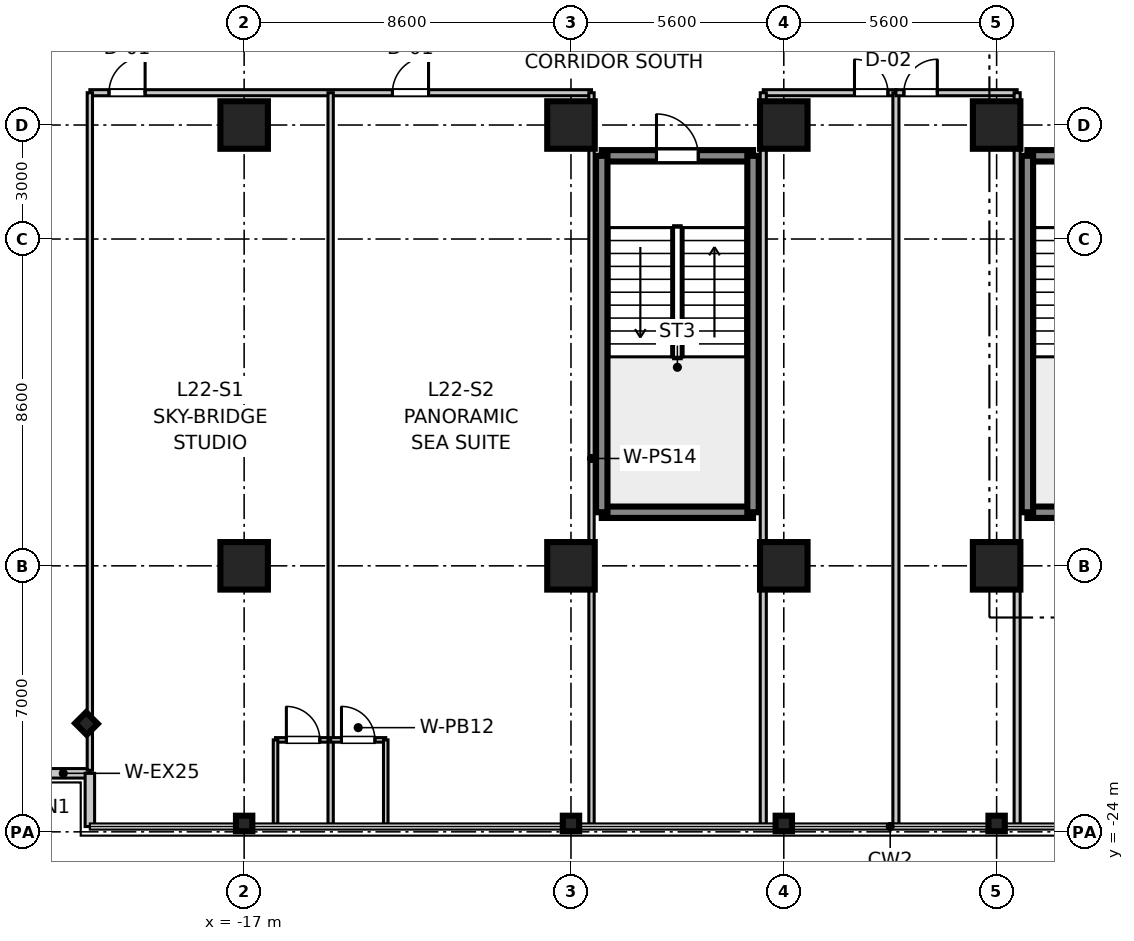
"""IFC4 building model, lengths in metres.
Left out: names, types, materials, properties, quantities, classifications, styles, units other than length and angle.
Written with IfcOpenShell. Run it as: python <this file> out.ifc"""

import sys

from ifc_helpers import new_model, si_unit, direction, frame, frame_2d, origin, origin_2d, place, context, subcontext, project, spatial, rectangle, i_section, extrude, source, transform, mapped, element, fill, save


model = new_model("IFC4")
c1 = context("Model", 3, precision=1e-05, world=origin(), true_north=direction((0.0, 1.0)))
c2 = subcontext(c1, "Body", "Model", "MODEL_VIEW")
j1 = project(units=[si_unit("LENGTHUNIT", "METRE"), si_unit("PLANEANGLEUNIT", "RADIAN")], contexts=[c1])
p1 = place(None, origin())
s1 = spatial("IfcSite", under=j1, at=p1, CompositionType="ELEMENT")
p2 = place(p1, origin())
s2 = spatial("IfcBuilding", under=s1, at=p2, CompositionType="ELEMENT")
p3 = place(p2, frame((0.0, 0.0, 91.95)))
s3 = spatial("IfcBuildingStorey", under=s2, at=p3, CompositionType="ELEMENT", Elevation=91.95)
m1 = source(origin(), c2, "Body", "SweptSolid", [
    extrude(rectangle(XDim=1.25, YDim=1.25, at=origin_2d()), origin(), (0.0, 0.0, 1.0), 3.605),
])
for number, where, z_axis, x_axis in (
    (1, (-17.0, -17.0, 0.0), (0.0, 0.0, 1.0), (1.0, 0.0, 0.0)),
    (2, (-17.0, -5.4, 0.0), (0.0, 0.0, 1.0), (1.0, 0.0, 0.0)),
    (3, (-8.4, -17.0, 0.0), (0.0, 0.0, 1.0), (1.0, 0.0, 0.0)),
    (4, (-8.4, -5.4, 0.0), (0.0, 0.0, 1.0), (1.0, 0.0, 0.0)),
    (5, (-2.8, -17.0, 0.0), (0.0, 0.0, 1.0), (1.0, 0.0, 0.0)),
    (6, (-2.8, -5.4, 0.0), (0.0, 0.0, 1.0), (1.0, 0.0, 0.0)),
    (7, (2.8, -17.0, 0.0), (0.0, 0.0, 1.0), (1.0, 0.0, 0.0)),
    (8, (2.8, -5.4, 0.0), (0.0, 0.0, 1.0), (1.0, 0.0, 0.0)),
):
    element("IfcColumn", number, at=place(p3, frame(where, z_axis=z_axis, x_axis=x_axis)), inside=s3, PredefinedType="COLUMN", context=c2, shape_type="MappedRepresentation", body=[
        mapped(m1, transform((0.0, 0.0, 0.0), scale=1.0)),
    ])
m2 = source(origin(), c2, "Body", "SweptSolid", [
    extrude(i_section(OverallWidth=0.409, OverallDepth=0.43, WebThickness=0.021, FlangeThickness=0.034, at=origin_2d()), origin(), (0.0, 0.0, 1.0), 3.605),
])
for number, where, z_axis, x_axis in (
    (9, (-17.0, -23.78, 0.0), (0.0, 0.0, 1.0), (0.0, 1.0, 0.0)),
    (10, (-8.4, -23.78, 0.0), (0.0, 0.0, 1.0), (0.0, 1.0, 0.0)),
    (11, (-2.8, -23.78, 0.0), (0.0, 0.0, 1.0), (0.0, 1.0, 0.0)),
    (12, (2.8, -23.78, 0.0), (0.0, 0.0, 1.0), (0.0, 1.0, 0.0)),
    (13, (-21.15, -21.15, 0.0), (0.0, 0.0, 1.0), (0.707, 0.707, 0.0)),
):
    element("IfcColumn", number, at=place(p3, frame(where, z_axis=z_axis, x_axis=x_axis)), inside=s3, PredefinedType="COLUMN", context=c2, shape_type="MappedRepresentation", body=[
        mapped(m2, transform((0.0, 0.0, 0.0), scale=1.0)),
    ])
m3 = source(origin(), c2, "Body", "SweptSolid", [
    extrude(rectangle(XDim=3.98, YDim=0.3, at=frame_2d((1.99, 0.0))), origin(), (0.0, 0.0, 1.0), 3.38),
])
for number, where, z_axis, x_axis in (
    (14, (3.61, -15.59, 0.0), (0.0, 0.0, 1.0), (1.0, 0.0, 0.0)),
    (15, (3.61, -6.21, 0.0), (0.0, 0.0, 1.0), (1.0, 0.0, 0.0)),
):
    element("IfcWall", number, at=place(p3, frame(where, z_axis=z_axis, x_axis=x_axis)), inside=s3, PredefinedType="SHEAR", context=c2, shape_type="MappedRepresentation", body=[
        mapped(m3, transform((0.0, 0.0, 0.0), scale=1.0)),
    ])
m4 = source(origin(), c2, "Body", "SweptSolid", [
    extrude(rectangle(XDim=9.38, YDim=0.3, at=frame_2d((4.69, 0.0))), origin(), (0.0, 0.0, 1.0), 3.38),
])
p4 = place(p3, frame((3.61, -15.59, 0.0), z_axis=(0.0, 0.0, 1.0), x_axis=(0.0, 1.0, 0.0)))
e16 = element("IfcWall", 16, at=p4, inside=s3, PredefinedType="SHEAR", context=c2, shape_type="MappedRepresentation", body=[
    mapped(m4, transform((0.0, 0.0, 0.0), scale=1.0)),
])
p5 = place(p3, frame((-7.59, -15.59, 0.0), z_axis=(0.0, 0.0, 1.0), x_axis=(1.0, 0.0, 0.0)))
e17 = element("IfcWall", 17, at=p5, inside=s3, PredefinedType="SHEAR", context=c2, shape_type="MappedRepresentation", body=[
    mapped(m3, transform((0.0, 0.0, 0.0), scale=1.0)),
])
p6 = place(p3, frame((-7.59, -6.21, 0.0), z_axis=(0.0, 0.0, 1.0), x_axis=(1.0, 0.0, 0.0)))
e18 = element("IfcWall", 18, at=p6, inside=s3, PredefinedType="SHEAR", context=c2, shape_type="MappedRepresentation", body=[
    mapped(m3, transform((0.0, 0.0, 0.0), scale=1.0)),
])
p7 = place(p6, frame((1.44, 0.0, 0.0)))
e19 = element("IfcOpeningElement", 19, at=p7, cuts=e18, PredefinedType="OPENING", context=c2, shape_type="SweptSolid", body=[
    extrude(rectangle(XDim=1.1, YDim=2.15, at=frame_2d((0.55, 1.075))), frame((0.0, 0.16, 0.0), z_axis=(0.0, -1.0, 0.0), x_axis=(1.0, 0.0, 0.0)), (0.0, 0.0, 1.0), 0.32),
])
for number, where, z_axis, x_axis in (
    (20, (-7.59, -15.59, 0.0), (0.0, 0.0, 1.0), (0.0, 1.0, 0.0)),
    (21, (-3.61, -15.59, 0.0), (0.0, 0.0, 1.0), (0.0, 1.0, 0.0)),
):
    element("IfcWall", number, at=place(p3, frame(where, z_axis=z_axis, x_axis=x_axis)), inside=s3, PredefinedType="SHEAR", context=c2, shape_type="MappedRepresentation", body=[
        mapped(m4, transform((0.0, 0.0, 0.0), scale=1.0)),
    ])
m5 = source(origin(), c2, "Body", "SweptSolid", [
    extrude(rectangle(XDim=1.4, YDim=0.25, at=frame_2d((0.7, 0.0))), origin(), (0.0, 0.0, 1.0), 3.38),
])
p8 = place(p3, frame((-22.46, -22.46, 0.0), z_axis=(0.0, 0.0, 1.0), x_axis=(1.0, 0.0, 0.0)))
e22 = element("IfcWall", 22, at=p8, inside=s3, PredefinedType="STANDARD", context=c2, shape_type="MappedRepresentation", body=[
    mapped(m5, transform((0.0, 0.0, 0.0), scale=1.0)),
])
m6 = source(origin(), c2, "Body", "SweptSolid", [
    extrude(rectangle(XDim=1.4, YDim=0.25, at=frame_2d((0.7, 0.0))), origin(), (0.0, 0.0, 1.0), 3.38),
])
p9 = place(p3, frame((-21.06, -23.86, 0.0), z_axis=(0.0, 0.0, 1.0), x_axis=(0.0, 1.0, 0.0)))
e23 = element("IfcWall", 23, at=p9, inside=s3, PredefinedType="STANDARD", context=c2, shape_type="MappedRepresentation", body=[
    mapped(m6, transform((0.0, 0.0, 0.0), scale=1.0)),
])
m7 = source(origin(), c2, "Body", "SweptSolid", [
    extrude(rectangle(XDim=13.2, YDim=0.16, at=frame_2d((6.6, 0.0))), origin(), (0.0, 0.0, 1.0), 2.72),
])
p10 = place(p3, frame((-21.06, -4.55, 0.0), z_axis=(0.0, 0.0, 1.0), x_axis=(1.0, 0.0, 0.0)))
e24 = element("IfcWall", 24, at=p10, inside=s3, PredefinedType="PARTITIONING", context=c2, shape_type="MappedRepresentation", body=[
    mapped(m7, transform((0.0, 0.0, 0.0), scale=1.0)),
])
p11 = place(p10, frame((0.504, 0.0, 0.0)))
e25 = element("IfcOpeningElement", 25, at=p11, cuts=e24, PredefinedType="OPENING", context=c2, shape_type="SweptSolid", body=[
    extrude(rectangle(XDim=0.95, YDim=2.1, at=frame_2d((0.475, 1.05))), frame((0.0, 0.09, 0.0), z_axis=(0.0, -1.0, 0.0), x_axis=(1.0, 0.0, 0.0)), (0.0, 0.0, 1.0), 0.18),
])
p12 = place(p10, frame((7.962, 0.0, 0.0)))
e26 = element("IfcOpeningElement", 26, at=p12, cuts=e24, PredefinedType="OPENING", context=c2, shape_type="SweptSolid", body=[
    extrude(rectangle(XDim=0.95, YDim=2.1, at=frame_2d((0.475, 1.05))), frame((0.0, 0.09, 0.0), z_axis=(0.0, -1.0, 0.0), x_axis=(1.0, 0.0, 0.0)), (0.0, 0.0, 1.0), 0.18),
])
m8 = source(origin(), c2, "Body", "SweptSolid", [
    extrude(rectangle(XDim=17.83, YDim=0.14, at=frame_2d((8.915, 0.0))), origin(), (0.0, 0.0, 1.0), 2.72),
])
p13 = place(p3, frame((-21.06, -22.38, 0.0), z_axis=(0.0, 0.0, 1.0), x_axis=(0.0, 1.0, 0.0)))
e27 = element("IfcWall", 27, at=p13, inside=s3, PredefinedType="PARTITIONING", context=c2, shape_type="MappedRepresentation", body=[
    mapped(m8, transform((0.0, 0.0, 0.0), scale=1.0)),
])
m9 = source(origin(), c2, "Body", "SweptSolid", [
    extrude(rectangle(XDim=19.25, YDim=0.14, at=frame_2d((9.625, 0.0))), origin(), (0.0, 0.0, 1.0), 2.72),
])
p14 = place(p3, frame((-7.86, -23.8, 0.0), z_axis=(0.0, 0.0, 1.0), x_axis=(0.0, 1.0, 0.0)))
e28 = element("IfcWall", 28, at=p14, inside=s3, PredefinedType="PARTITIONING", context=c2, shape_type="MappedRepresentation", body=[
    mapped(m9, transform((0.0, 0.0, 0.0), scale=1.0)),
])
m10 = source(origin(), c2, "Body", "SweptSolid", [
    extrude(rectangle(XDim=1.45, YDim=0.12, at=frame_2d((0.725, 0.0))), origin(), (0.0, 0.0, 1.0), 2.72),
])
p15 = place(p3, frame((-16.174, -21.58, 0.0), z_axis=(0.0, 0.0, 1.0), x_axis=(1.0, 0.0, 0.0)))
e29 = element("IfcWall", 29, at=p15, inside=s3, PredefinedType="PARTITIONING", context=c2, shape_type="MappedRepresentation", body=[
    mapped(m10, transform((0.0, 0.0, 0.0), scale=1.0)),
])
p16 = place(p15, frame((0.285, 0.0, 0.0)))
e30 = element("IfcOpeningElement", 30, at=p16, cuts=e29, PredefinedType="OPENING", context=c2, shape_type="SweptSolid", body=[
    extrude(rectangle(XDim=0.88, YDim=2.1, at=frame_2d((0.44, 1.05))), frame((0.0, 0.07, 0.0), z_axis=(0.0, -1.0, 0.0), x_axis=(1.0, 0.0, 0.0)), (0.0, 0.0, 1.0), 0.14),
])
m11 = source(origin(), c2, "Body", "SweptSolid", [
    extrude(rectangle(XDim=2.22, YDim=0.12, at=frame_2d((1.11, 0.0))), origin(), (0.0, 0.0, 1.0), 2.72),
])
p17 = place(p3, frame((-16.174, -23.8, 0.0), z_axis=(0.0, 0.0, 1.0), x_axis=(0.0, 1.0, 0.0)))
e31 = element("IfcWall", 31, at=p17, inside=s3, PredefinedType="PARTITIONING", context=c2, shape_type="MappedRepresentation", body=[
    mapped(m11, transform((0.0, 0.0, 0.0), scale=1.0)),
])
p18 = place(p3, frame((-14.724, -23.8, 0.0), z_axis=(0.0, 0.0, 1.0), x_axis=(0.0, 1.0, 0.0)))
e32 = element("IfcWall", 32, at=p18, inside=s3, PredefinedType="PARTITIONING", context=c2, shape_type="MappedRepresentation", body=[
    mapped(m9, transform((0.0, 0.0, 0.0), scale=1.0)),
])
m12 = source(origin(), c2, "Body", "SweptSolid", [
    extrude(rectangle(XDim=1.45, YDim=0.12, at=frame_2d((0.725, 0.0))), origin(), (0.0, 0.0, 1.0), 2.72),
])
p19 = place(p3, frame((-14.724, -21.58, 0.0), z_axis=(0.0, 0.0, 1.0), x_axis=(1.0, 0.0, 0.0)))
e33 = element("IfcWall", 33, at=p19, inside=s3, PredefinedType="PARTITIONING", context=c2, shape_type="MappedRepresentation", body=[
    mapped(m12, transform((0.0, 0.0, 0.0), scale=1.0)),
])
p20 = place(p19, frame((0.285, 0.0, 0.0)))
e34 = element("IfcOpeningElement", 34, at=p20, cuts=e33, PredefinedType="OPENING", context=c2, shape_type="SweptSolid", body=[
    extrude(rectangle(XDim=0.88, YDim=2.1, at=frame_2d((0.44, 1.05))), frame((0.0, 0.07, 0.0), z_axis=(0.0, -1.0, 0.0), x_axis=(1.0, 0.0, 0.0)), (0.0, 0.0, 1.0), 0.14),
])
p21 = place(p3, frame((-13.274, -23.8, 0.0), z_axis=(0.0, 0.0, 1.0), x_axis=(0.0, 1.0, 0.0)))
e35 = element("IfcWall", 35, at=p21, inside=s3, PredefinedType="PARTITIONING", context=c2, shape_type="MappedRepresentation", body=[
    mapped(m11, transform((0.0, 0.0, 0.0), scale=1.0)),
])
m13 = source(origin(), c2, "Body", "SweptSolid", [
    extrude(rectangle(XDim=3.49, YDim=0.16, at=frame_2d((1.745, 0.0))), origin(), (0.0, 0.0, 1.0), 2.72),
])
p22 = place(p3, frame((-3.34, -4.55, 0.0), z_axis=(0.0, 0.0, 1.0), x_axis=(1.0, 0.0, 0.0)))
e36 = element("IfcWall", 36, at=p22, inside=s3, PredefinedType="PARTITIONING", context=c2, shape_type="MappedRepresentation", body=[
    mapped(m13, transform((0.0, 0.0, 0.0), scale=1.0)),
])
p23 = place(p22, frame((2.4, 0.0, 0.0)))
e37 = element("IfcOpeningElement", 37, at=p23, cuts=e36, PredefinedType="OPENING", context=c2, shape_type="SweptSolid", body=[
    extrude(rectangle(XDim=0.88, YDim=2.1, at=frame_2d((0.44, 1.05))), frame((0.0, 0.09, 0.0), z_axis=(0.0, -1.0, 0.0), x_axis=(1.0, 0.0, 0.0)), (0.0, 0.0, 1.0), 0.18),
])
m14 = source(origin(), c2, "Body", "SweptSolid", [
    extrude(rectangle(XDim=19.25, YDim=0.16, at=frame_2d((9.625, 0.0))), origin(), (0.0, 0.0, 1.0), 2.72),
])
for number, where, z_axis, x_axis in (
    (38, (-3.34, -23.8, 0.0), (0.0, 0.0, 1.0), (0.0, 1.0, 0.0)),
    (39, (0.15, -23.8, 0.0), (0.0, 0.0, 1.0), (0.0, 1.0, 0.0)),
):
    element("IfcWall", number, at=place(p3, frame(where, z_axis=z_axis, x_axis=x_axis)), inside=s3, PredefinedType="PARTITIONING", context=c2, shape_type="MappedRepresentation", body=[
        mapped(m14, transform((0.0, 0.0, 0.0), scale=1.0)),
    ])
m15 = source(origin(), c2, "Body", "SweptSolid", [
    extrude(rectangle(XDim=3.19, YDim=0.16, at=frame_2d((1.595, 0.0))), origin(), (0.0, 0.0, 1.0), 2.72),
])
p24 = place(p3, frame((0.15, -4.55, 0.0), z_axis=(0.0, 0.0, 1.0), x_axis=(1.0, 0.0, 0.0)))
e40 = element("IfcWall", 40, at=p24, inside=s3, PredefinedType="PARTITIONING", context=c2, shape_type="MappedRepresentation", body=[
    mapped(m15, transform((0.0, 0.0, 0.0), scale=1.0)),
])
p25 = place(p24, frame((0.21, 0.0, 0.0)))
e41 = element("IfcOpeningElement", 41, at=p25, cuts=e40, PredefinedType="OPENING", context=c2, shape_type="SweptSolid", body=[
    extrude(rectangle(XDim=0.88, YDim=2.1, at=frame_2d((0.44, 1.05))), frame((0.0, 0.09, 0.0), z_axis=(0.0, -1.0, 0.0), x_axis=(1.0, 0.0, 0.0)), (0.0, 0.0, 1.0), 0.18),
])
p26 = place(p3, frame((3.34, -23.8, 0.0), z_axis=(0.0, 0.0, 1.0), x_axis=(0.0, 1.0, 0.0)))
e42 = element("IfcWall", 42, at=p26, inside=s3, PredefinedType="PARTITIONING", context=c2, shape_type="MappedRepresentation", body=[
    mapped(m14, transform((0.0, 0.0, 0.0), scale=1.0)),
])
m16 = source(origin(), c2, "Body", "SweptSolid", [
    extrude(rectangle(XDim=1.1, YDim=2.15, at=frame_2d((0.55, 1.075))), frame((0.0, 0.025, 0.0), z_axis=(0.0, -1.0, 0.0), x_axis=(1.0, 0.0, 0.0)), (0.0, 0.0, 1.0), 0.05),
])
p27 = place(p7, frame((1.1, 0.0, 0.0), z_axis=(0.0, 0.0, 1.0), x_axis=(-1.0, 0.0, 0.0)))
e43 = element("IfcDoor", 43, at=p27, inside=s3, OperationType="SINGLE_SWING_LEFT", PredefinedType="DOOR", context=c2, shape_type="MappedRepresentation", body=[
    mapped(m16, transform((0.0, 0.0, 0.0), scale=1.0)),
])
fill(e19, e43)
m17 = source(origin(), c2, "Body", "SweptSolid", [
    extrude(rectangle(XDim=0.88, YDim=2.1, at=frame_2d((0.44, 1.05))), frame((0.0, 0.025, 0.0), z_axis=(0.0, -1.0, 0.0), x_axis=(1.0, 0.0, 0.0)), (0.0, 0.0, 1.0), 0.05),
])
p28 = place(p16, frame((0.88, 0.0, 0.0), z_axis=(0.0, 0.0, 1.0), x_axis=(-1.0, 0.0, 0.0)))
e44 = element("IfcDoor", 44, at=p28, inside=s3, OperationType="SINGLE_SWING_LEFT", PredefinedType="DOOR", context=c2, shape_type="MappedRepresentation", body=[
    mapped(m17, transform((0.0, 0.0, 0.0), scale=1.0)),
])
fill(e30, e44)
m18 = source(origin(), c2, "Body", "SweptSolid", [
    extrude(rectangle(XDim=0.95, YDim=2.1, at=frame_2d((0.475, 1.05))), frame((0.0, 0.025, 0.0), z_axis=(0.0, -1.0, 0.0), x_axis=(1.0, 0.0, 0.0)), (0.0, 0.0, 1.0), 0.05),
])
p29 = place(p11, frame((0.95, 0.0, 0.0), z_axis=(0.0, 0.0, 1.0), x_axis=(-1.0, 0.0, 0.0)))
e45 = element("IfcDoor", 45, at=p29, inside=s3, OperationType="SINGLE_SWING_RIGHT", PredefinedType="DOOR", context=c2, shape_type="MappedRepresentation", body=[
    mapped(m18, transform((0.0, 0.0, 0.0), scale=1.0)),
])
fill(e25, e45)
p30 = place(p20, frame((0.88, 0.0, 0.0), z_axis=(0.0, 0.0, 1.0), x_axis=(-1.0, 0.0, 0.0)))
e46 = element("IfcDoor", 46, at=p30, inside=s3, OperationType="SINGLE_SWING_LEFT", PredefinedType="DOOR", context=c2, shape_type="MappedRepresentation", body=[
    mapped(m17, transform((0.0, 0.0, 0.0), scale=1.0)),
])
fill(e34, e46)
p31 = place(p12, frame((0.95, 0.0, 0.0), z_axis=(0.0, 0.0, 1.0), x_axis=(-1.0, 0.0, 0.0)))
e47 = element("IfcDoor", 47, at=p31, inside=s3, OperationType="SINGLE_SWING_RIGHT", PredefinedType="DOOR", context=c2, shape_type="MappedRepresentation", body=[
    mapped(m18, transform((0.0, 0.0, 0.0), scale=1.0)),
])
fill(e26, e47)
p32 = place(p23, frame((0.88, 0.0, 0.0), z_axis=(0.0, 0.0, 1.0), x_axis=(-1.0, 0.0, 0.0)))
e48 = element("IfcDoor", 48, at=p32, inside=s3, OperationType="SINGLE_SWING_LEFT", PredefinedType="DOOR", context=c2, shape_type="MappedRepresentation", body=[
    mapped(m17, transform((0.0, 0.0, 0.0), scale=1.0)),
])
fill(e37, e48)
p33 = place(p25, frame((0.88, 0.0, 0.0), z_axis=(0.0, 0.0, 1.0), x_axis=(-1.0, 0.0, 0.0)))
e49 = element("IfcDoor", 49, at=p33, inside=s3, OperationType="SINGLE_SWING_RIGHT", PredefinedType="DOOR", context=c2, shape_type="MappedRepresentation", body=[
    mapped(m17, transform((0.0, 0.0, 0.0), scale=1.0)),
])
fill(e41, e49)
save(model, sys.argv[1])
